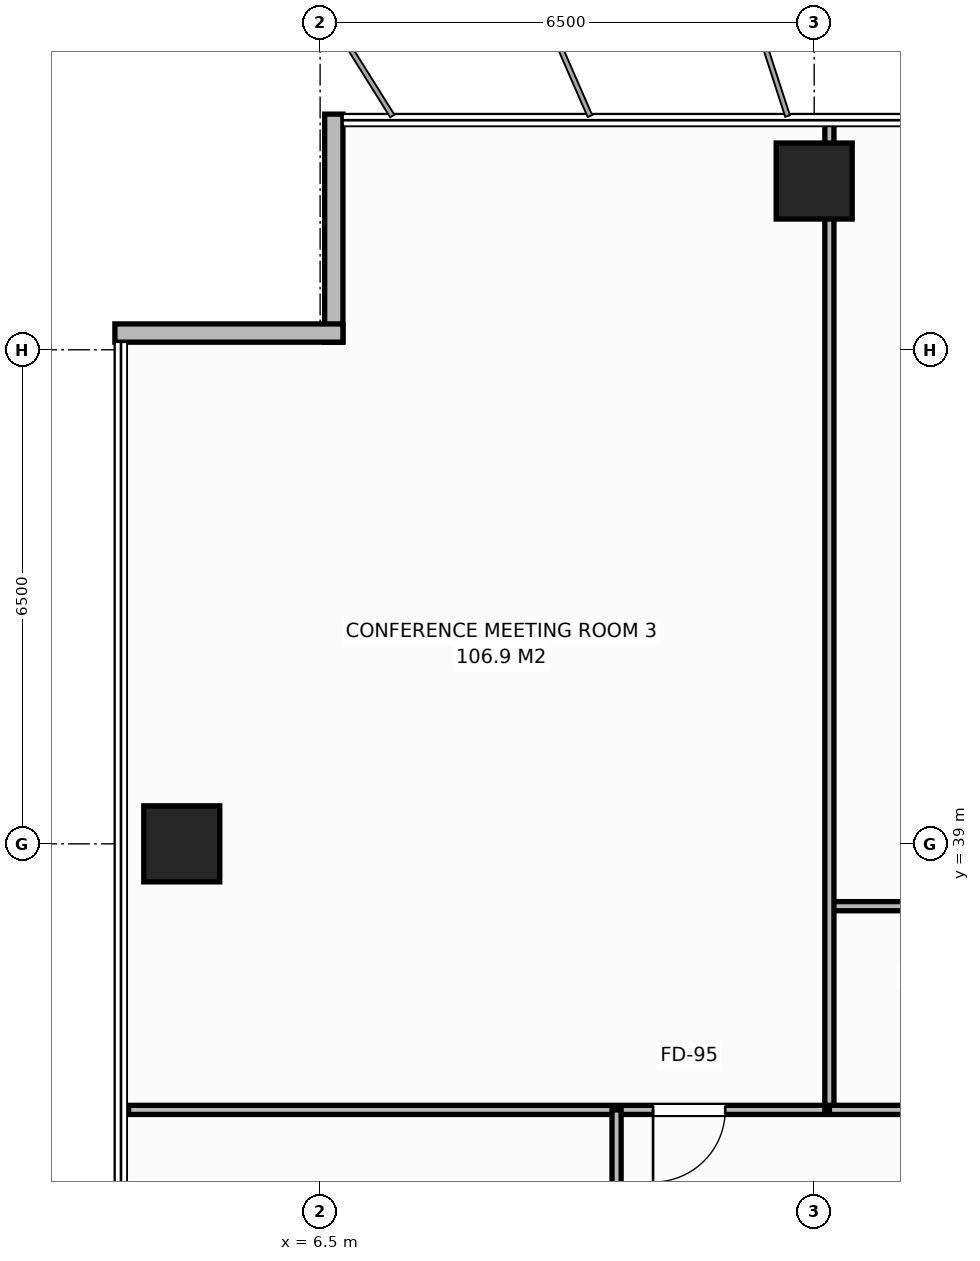
"""IFC4 building model, lengths in metres.
Left out: names, types, materials, properties, quantities, classifications, styles, units other than length and angle.
Written with IfcOpenShell. Run it as: python <this file> out.ifc"""

import sys

from ifc_helpers import new_model, si_unit, direction, frame, frame_2d, origin, origin_2d, place, context, subcontext, project, spatial, rectangle, extrude, element, fill, save


model = new_model("IFC4")
c1 = context("Model", 3, precision=1e-05, world=origin(), true_north=direction((0.0, 1.0)))
c2 = subcontext(c1, "Body", "Model", "MODEL_VIEW")
j1 = project(units=[si_unit("LENGTHUNIT", "METRE"), si_unit("PLANEANGLEUNIT", "RADIAN")], contexts=[c1])
p1 = place(None, origin())
s1 = spatial("IfcSite", under=j1, at=p1, CompositionType="ELEMENT")
p2 = place(p1, origin())
s2 = spatial("IfcBuilding", under=s1, at=p2, CompositionType="ELEMENT")
p3 = place(p2, frame((0.0, 0.0, 193.6)))
s3 = spatial("IfcBuildingStorey", under=s2, at=p3, CompositionType="ELEMENT", Elevation=193.6)
for number, where, z_axis, x_axis in (
    (1, (13.0, 47.72, 0.0), (0.0, 0.0, 1.0), (1.0, 0.0, 0.0)),
    (2, (4.68, 39.0, 0.0), (0.0, 0.0, 1.0), (1.0, 0.0, 0.0)),
):
    element("IfcColumn", number, at=place(p3, frame(where, z_axis=z_axis, x_axis=x_axis)), inside=s3, PredefinedType="COLUMN", context=c2, shape_type="SweptSolid", body=[
        extrude(rectangle(XDim=1.0, YDim=1.0, at=origin_2d()), origin(), (0.0, 0.0, 1.0), 3.8),
    ])
for number, where, z_axis, x_axis in (
    (3, (6.68, 45.6, 0.0), (0.0, 0.0, 1.0), (0.0, 1.0, 0.0)),
    (4, (3.8, 45.72, 0.0), (0.0, 0.0, 1.0), (1.0, 0.0, 0.0)),
):
    element("IfcWall", number, at=place(p3, frame(where, z_axis=z_axis, x_axis=x_axis)), inside=s3, PredefinedType="STANDARD", context=c2, shape_type="SweptSolid", body=[
        extrude(rectangle(XDim=3.0, YDim=0.24, at=frame_2d((1.5, 0.0))), origin(), (0.0, 0.0, 1.0), 3.52),
    ])
p4 = place(p3, frame((13.2, 35.5, 0.0), z_axis=(0.0, 0.0, 1.0), x_axis=(1.0, 0.0, 0.0)))
e5 = element("IfcWall", 5, at=p4, inside=s3, PredefinedType="PARTITIONING", context=c2, shape_type="SweptSolid", body=[
    extrude(rectangle(XDim=13.16, YDim=0.12, at=frame_2d((6.58, 0.0))), origin(), (0.0, 0.0, 1.0), 3.52),
])
p5 = place(p4, frame((1.35, 0.0, 0.0)))
e6 = element("IfcOpeningElement", 6, at=p5, cuts=e5, PredefinedType="OPENING", context=c2, shape_type="SweptSolid", body=[
    extrude(rectangle(XDim=0.9, YDim=2.15, at=frame_2d((0.45, 1.075))), frame((0.0, 0.07, 0.0), z_axis=(0.0, -1.0, 0.0), x_axis=(1.0, 0.0, 0.0)), (0.0, 0.0, 1.0), 0.14),
])
p6 = place(p4, frame((4.05, 0.0, 0.0)))
e7 = element("IfcOpeningElement", 7, at=p6, cuts=e5, PredefinedType="OPENING", context=c2, shape_type="SweptSolid", body=[
    extrude(rectangle(XDim=0.9, YDim=2.15, at=frame_2d((0.45, 1.075))), frame((0.0, 0.07, 0.0), z_axis=(0.0, -1.0, 0.0), x_axis=(1.0, 0.0, 0.0)), (0.0, 0.0, 1.0), 0.14),
])
p7 = place(p4, frame((8.25, 0.0, 0.0)))
e8 = element("IfcOpeningElement", 8, at=p7, cuts=e5, PredefinedType="OPENING", context=c2, shape_type="SweptSolid", body=[
    extrude(rectangle(XDim=0.9, YDim=2.15, at=frame_2d((0.45, 1.075))), frame((0.0, 0.07, 0.0), z_axis=(0.0, -1.0, 0.0), x_axis=(1.0, 0.0, 0.0)), (0.0, 0.0, 1.0), 0.14),
])
p8 = place(p4, frame((11.0, 0.0, 0.0)))
e9 = element("IfcOpeningElement", 9, at=p8, cuts=e5, PredefinedType="OPENING", context=c2, shape_type="SweptSolid", body=[
    extrude(rectangle(XDim=0.95, YDim=2.15, at=frame_2d((0.475, 1.075))), frame((0.0, 0.07, 0.0), z_axis=(0.0, -1.0, 0.0), x_axis=(1.0, 0.0, 0.0)), (0.0, 0.0, 1.0), 0.14),
])
p9 = place(p3, frame((13.2, 38.18, 0.0), z_axis=(0.0, 0.0, 1.0), x_axis=(1.0, 0.0, 0.0)))
e10 = element("IfcWall", 10, at=p9, inside=s3, PredefinedType="PARTITIONING", context=c2, shape_type="SweptSolid", body=[
    extrude(rectangle(XDim=13.16, YDim=0.12, at=frame_2d((6.58, 0.0))), origin(), (0.0, 0.0, 1.0), 3.52),
])
p10 = place(p3, frame((13.2, 35.56, 0.0), z_axis=(0.0, 0.0, 1.0), x_axis=(0.0, 1.0, 0.0)))
e11 = element("IfcWall", 11, at=p10, inside=s3, PredefinedType="PARTITIONING", context=c2, shape_type="SweptSolid", body=[
    extrude(rectangle(XDim=13.02, YDim=0.12, at=frame_2d((6.51, 0.0))), origin(), (0.0, 0.0, 1.0), 2.72),
])
p11 = place(p3, frame((3.98, 35.5, 0.0), z_axis=(0.0, 0.0, 1.0), x_axis=(1.0, 0.0, 0.0)))
e12 = element("IfcWall", 12, at=p11, inside=s3, PredefinedType="PARTITIONING", context=c2, shape_type="SweptSolid", body=[
    extrude(rectangle(XDim=9.16, YDim=0.12, at=frame_2d((4.58, 0.0))), origin(), (0.0, 0.0, 1.0), 3.52),
])
p12 = place(p11, frame((6.9, 0.0, 0.0)))
e13 = element("IfcOpeningElement", 13, at=p12, cuts=e12, PredefinedType="OPENING", context=c2, shape_type="SweptSolid", body=[
    extrude(rectangle(XDim=0.95, YDim=2.15, at=frame_2d((0.475, 1.075))), frame((0.0, 0.07, 0.0), z_axis=(0.0, -1.0, 0.0), x_axis=(1.0, 0.0, 0.0)), (0.0, 0.0, 1.0), 0.14),
])
p13 = place(p3, frame((10.4, 29.167, 0.0), z_axis=(0.0, 0.0, 1.0), x_axis=(0.0, 1.0, 0.0)))
e14 = element("IfcWall", 14, at=p13, inside=s3, PredefinedType="PARTITIONING", context=c2, shape_type="SweptSolid", body=[
    extrude(rectangle(XDim=6.333, YDim=0.12, at=frame_2d((3.167, 0.0))), origin(), (0.0, 0.0, 1.0), 3.52),
])
p14 = place(p13, frame((1.642, 0.0, 0.0)))
e15 = element("IfcOpeningElement", 15, at=p14, cuts=e14, PredefinedType="OPENING", context=c2, shape_type="SweptSolid", body=[
    extrude(rectangle(XDim=0.95, YDim=2.15, at=frame_2d((0.475, 1.075))), frame((0.0, 0.07, 0.0), z_axis=(0.0, -1.0, 0.0), x_axis=(1.0, 0.0, 0.0)), (0.0, 0.0, 1.0), 0.14),
])
p15 = place(p12, origin())
e16 = element("IfcDoor", 16, at=p15, inside=s3, OperationType="SINGLE_SWING_RIGHT", PredefinedType="DOOR", context=c2, shape_type="SweptSolid", body=[
    extrude(rectangle(XDim=0.95, YDim=2.15, at=frame_2d((0.475, 1.075))), frame((0.0, 0.025, 0.0), z_axis=(0.0, -1.0, 0.0), x_axis=(1.0, 0.0, 0.0)), (0.0, 0.0, 1.0), 0.05),
])
fill(e13, e16)
save(model, sys.argv[1])
